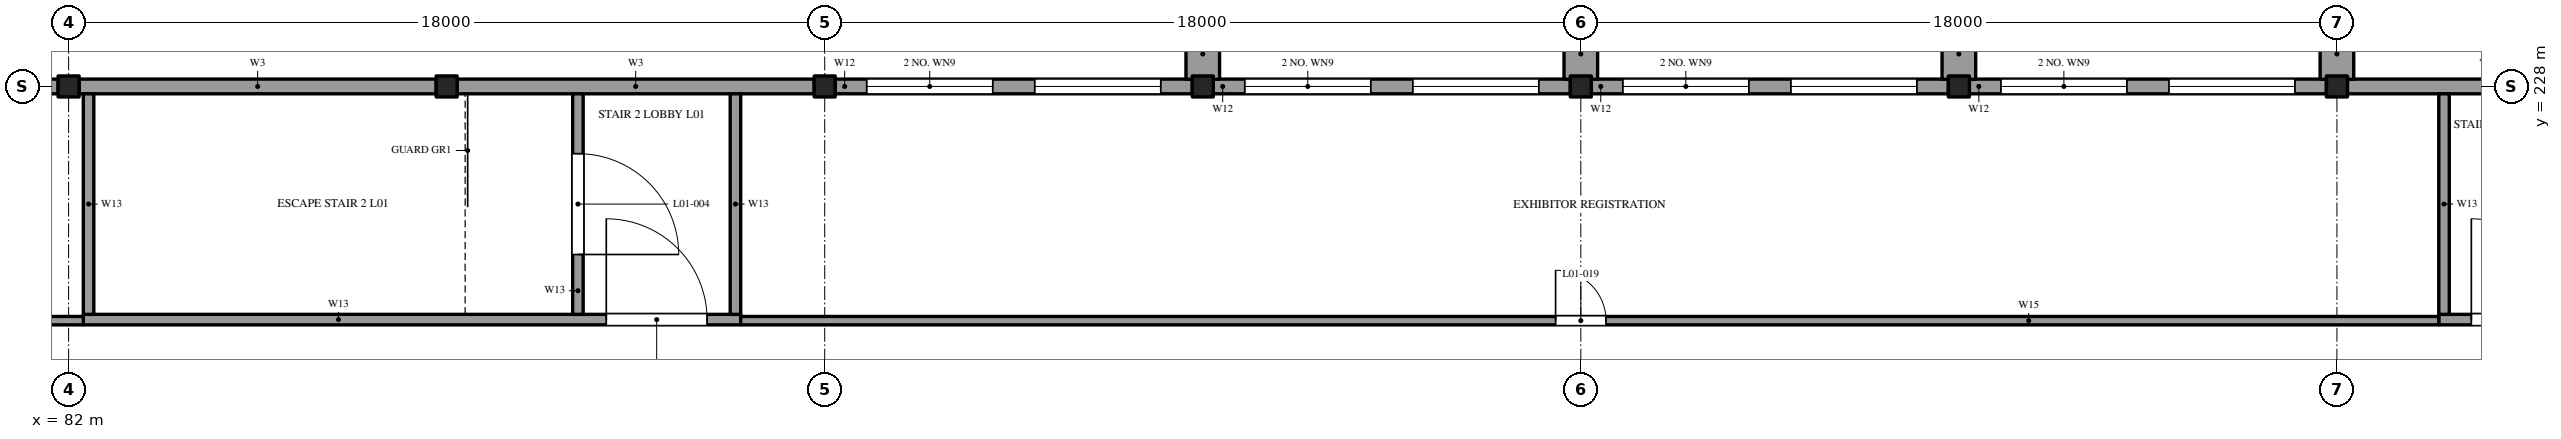
"""IFC4 building model, lengths in metres.
Left out: names, types, materials, properties, quantities, classifications, styles, units other than length and angle.
Written with IfcOpenShell. Run it as: python <this file> out.ifc"""

import sys

from ifc_helpers import new_model, si_unit, direction, frame, frame_2d, origin, origin_2d, place, context, subcontext, project, spatial, polyline, rectangle, outline, extrude, element, fill, save


model = new_model("IFC4")
c1 = context("Model", 3, precision=1e-05, world=origin(), true_north=direction((0.0, 1.0)))
c2 = subcontext(c1, "Body", "Model", "MODEL_VIEW")
j1 = project(units=[si_unit("LENGTHUNIT", "METRE"), si_unit("PLANEANGLEUNIT", "RADIAN")], contexts=[c1])
p1 = place(None, origin())
s1 = spatial("IfcSite", under=j1, at=p1, CompositionType="ELEMENT")
p2 = place(p1, origin())
s2 = spatial("IfcBuilding", under=s1, at=p2, CompositionType="ELEMENT")
p3 = place(p2, frame((0.0, 0.0, 7.2)))
s3 = spatial("IfcBuildingStorey", under=s2, at=p3, CompositionType="ELEMENT", Elevation=7.2)
for number, where, z_axis, x_axis in (
    (1, (82.0, 228.0, 0.0), (0.0, 0.0, 1.0), (1.0, 0.0, 0.0)),
    (2, (91.0, 228.0, 0.0), (0.0, 0.0, 1.0), (1.0, 0.0, 0.0)),
    (3, (100.0, 228.0, 0.0), (0.0, 0.0, 1.0), (1.0, 0.0, 0.0)),
    (4, (109.0, 228.0, 0.0), (0.0, 0.0, 1.0), (1.0, 0.0, 0.0)),
    (5, (118.0, 228.0, 0.0), (0.0, 0.0, 1.0), (1.0, 0.0, 0.0)),
    (6, (127.0, 228.0, 0.0), (0.0, 0.0, 1.0), (1.0, 0.0, 0.0)),
    (7, (136.0, 228.0, 0.0), (0.0, 0.0, 1.0), (1.0, 0.0, 0.0)),
):
    element("IfcColumn", number, at=place(p3, frame(where, z_axis=z_axis, x_axis=x_axis)), inside=s3, PredefinedType="COLUMN", context=c2, shape_type="SweptSolid", body=[
        extrude(rectangle(XDim=0.5, YDim=0.5, at=origin_2d()), origin(), (0.0, 0.0, 1.0), 4.121),
    ])
p4 = place(p3, frame((73.25, 228.0, 0.0), z_axis=(0.0, 0.0, 1.0), x_axis=(1.0, 0.0, 0.0)))
e8 = element("IfcWall", 8, at=p4, inside=s3, PredefinedType="SOLIDWALL", context=c2, shape_type="SweptSolid", body=[
    extrude(rectangle(XDim=8.5, YDim=0.35, at=frame_2d((4.25, 0.0))), origin(), (0.0, 0.0, 1.0), 4.112),
])
p5 = place(p4, frame((0.75, 0.0, 1.0)))
e9 = element("IfcOpeningElement", 9, at=p5, cuts=e8, PredefinedType="OPENING", context=c2, shape_type="SweptSolid", body=[
    extrude(rectangle(XDim=3.0, YDim=2.0, at=frame_2d((1.5, 1.0))), frame((0.0, 0.185, 0.0), z_axis=(0.0, -1.0, 0.0), x_axis=(1.0, 0.0, 0.0)), (0.0, 0.0, 1.0), 0.37),
])
p6 = place(p4, frame((4.75, 0.0, 1.0)))
e10 = element("IfcOpeningElement", 10, at=p6, cuts=e8, PredefinedType="OPENING", context=c2, shape_type="SweptSolid", body=[
    extrude(rectangle(XDim=3.0, YDim=2.0, at=frame_2d((1.5, 1.0))), frame((0.0, 0.185, 0.0), z_axis=(0.0, -1.0, 0.0), x_axis=(1.0, 0.0, 0.0)), (0.0, 0.0, 1.0), 0.37),
])
for number, where, z_axis, x_axis in (
    (11, (82.25, 228.0, 0.0), (0.0, 0.0, 1.0), (1.0, 0.0, 0.0)),
    (12, (91.25, 228.0, 0.0), (0.0, 0.0, 1.0), (1.0, 0.0, 0.0)),
):
    element("IfcWall", number, at=place(p3, frame(where, z_axis=z_axis, x_axis=x_axis)), inside=s3, PredefinedType="SOLIDWALL", context=c2, shape_type="SweptSolid", body=[
        extrude(rectangle(XDim=8.5, YDim=0.35, at=frame_2d((4.25, 0.0))), origin(), (0.0, 0.0, 1.0), 4.112),
    ])
p7 = place(p3, frame((100.25, 228.0, 0.0), z_axis=(0.0, 0.0, 1.0), x_axis=(1.0, 0.0, 0.0)))
e13 = element("IfcWall", 13, at=p7, inside=s3, PredefinedType="SOLIDWALL", context=c2, shape_type="SweptSolid", body=[
    extrude(rectangle(XDim=8.5, YDim=0.35, at=frame_2d((4.25, 0.0))), origin(), (0.0, 0.0, 1.0), 4.112),
])
p8 = place(p7, frame((0.75, 0.0, 1.0)))
e14 = element("IfcOpeningElement", 14, at=p8, cuts=e13, PredefinedType="OPENING", context=c2, shape_type="SweptSolid", body=[
    extrude(rectangle(XDim=3.0, YDim=2.0, at=frame_2d((1.5, 1.0))), frame((0.0, 0.185, 0.0), z_axis=(0.0, -1.0, 0.0), x_axis=(1.0, 0.0, 0.0)), (0.0, 0.0, 1.0), 0.37),
])
p9 = place(p7, frame((4.75, 0.0, 1.0)))
e15 = element("IfcOpeningElement", 15, at=p9, cuts=e13, PredefinedType="OPENING", context=c2, shape_type="SweptSolid", body=[
    extrude(rectangle(XDim=3.0, YDim=2.0, at=frame_2d((1.5, 1.0))), frame((0.0, 0.185, 0.0), z_axis=(0.0, -1.0, 0.0), x_axis=(1.0, 0.0, 0.0)), (0.0, 0.0, 1.0), 0.37),
])
p10 = place(p3, frame((109.25, 228.0, 0.0), z_axis=(0.0, 0.0, 1.0), x_axis=(1.0, 0.0, 0.0)))
e16 = element("IfcWall", 16, at=p10, inside=s3, PredefinedType="SOLIDWALL", context=c2, shape_type="SweptSolid", body=[
    extrude(rectangle(XDim=8.5, YDim=0.35, at=frame_2d((4.25, 0.0))), origin(), (0.0, 0.0, 1.0), 4.112),
])
p11 = place(p10, frame((0.75, 0.0, 1.0)))
e17 = element("IfcOpeningElement", 17, at=p11, cuts=e16, PredefinedType="OPENING", context=c2, shape_type="SweptSolid", body=[
    extrude(rectangle(XDim=3.0, YDim=2.0, at=frame_2d((1.5, 1.0))), frame((0.0, 0.185, 0.0), z_axis=(0.0, -1.0, 0.0), x_axis=(1.0, 0.0, 0.0)), (0.0, 0.0, 1.0), 0.37),
])
p12 = place(p10, frame((4.75, 0.0, 1.0)))
e18 = element("IfcOpeningElement", 18, at=p12, cuts=e16, PredefinedType="OPENING", context=c2, shape_type="SweptSolid", body=[
    extrude(rectangle(XDim=3.0, YDim=2.0, at=frame_2d((1.5, 1.0))), frame((0.0, 0.185, 0.0), z_axis=(0.0, -1.0, 0.0), x_axis=(1.0, 0.0, 0.0)), (0.0, 0.0, 1.0), 0.37),
])
p13 = place(p3, frame((118.25, 228.0, 0.0), z_axis=(0.0, 0.0, 1.0), x_axis=(1.0, 0.0, 0.0)))
e19 = element("IfcWall", 19, at=p13, inside=s3, PredefinedType="SOLIDWALL", context=c2, shape_type="SweptSolid", body=[
    extrude(rectangle(XDim=8.5, YDim=0.35, at=frame_2d((4.25, 0.0))), origin(), (0.0, 0.0, 1.0), 4.112),
])
p14 = place(p13, frame((0.75, 0.0, 1.0)))
e20 = element("IfcOpeningElement", 20, at=p14, cuts=e19, PredefinedType="OPENING", context=c2, shape_type="SweptSolid", body=[
    extrude(rectangle(XDim=3.0, YDim=2.0, at=frame_2d((1.5, 1.0))), frame((0.0, 0.185, 0.0), z_axis=(0.0, -1.0, 0.0), x_axis=(1.0, 0.0, 0.0)), (0.0, 0.0, 1.0), 0.37),
])
p15 = place(p13, frame((4.75, 0.0, 1.0)))
e21 = element("IfcOpeningElement", 21, at=p15, cuts=e19, PredefinedType="OPENING", context=c2, shape_type="SweptSolid", body=[
    extrude(rectangle(XDim=3.0, YDim=2.0, at=frame_2d((1.5, 1.0))), frame((0.0, 0.185, 0.0), z_axis=(0.0, -1.0, 0.0), x_axis=(1.0, 0.0, 0.0)), (0.0, 0.0, 1.0), 0.37),
])
p16 = place(p3, frame((127.25, 228.0, 0.0), z_axis=(0.0, 0.0, 1.0), x_axis=(1.0, 0.0, 0.0)))
e22 = element("IfcWall", 22, at=p16, inside=s3, PredefinedType="SOLIDWALL", context=c2, shape_type="SweptSolid", body=[
    extrude(rectangle(XDim=8.5, YDim=0.35, at=frame_2d((4.25, 0.0))), origin(), (0.0, 0.0, 1.0), 4.112),
])
p17 = place(p16, frame((0.75, 0.0, 1.0)))
e23 = element("IfcOpeningElement", 23, at=p17, cuts=e22, PredefinedType="OPENING", context=c2, shape_type="SweptSolid", body=[
    extrude(rectangle(XDim=3.0, YDim=2.0, at=frame_2d((1.5, 1.0))), frame((0.0, 0.185, 0.0), z_axis=(0.0, -1.0, 0.0), x_axis=(1.0, 0.0, 0.0)), (0.0, 0.0, 1.0), 0.37),
])
p18 = place(p16, frame((4.75, 0.0, 1.0)))
e24 = element("IfcOpeningElement", 24, at=p18, cuts=e22, PredefinedType="OPENING", context=c2, shape_type="SweptSolid", body=[
    extrude(rectangle(XDim=3.0, YDim=2.0, at=frame_2d((1.5, 1.0))), frame((0.0, 0.185, 0.0), z_axis=(0.0, -1.0, 0.0), x_axis=(1.0, 0.0, 0.0)), (0.0, 0.0, 1.0), 0.37),
])
p19 = place(p3, frame((136.25, 228.0, 0.0), z_axis=(0.0, 0.0, 1.0), x_axis=(1.0, 0.0, 0.0)))
e25 = element("IfcWall", 25, at=p19, inside=s3, PredefinedType="SOLIDWALL", context=c2, shape_type="SweptSolid", body=[
    extrude(rectangle(XDim=8.5, YDim=0.35, at=frame_2d((4.25, 0.0))), origin(), (0.0, 0.0, 1.0), 4.112),
])
p20 = place(p3, frame((82.35, 222.45, 0.0), z_axis=(0.0, 0.0, 1.0), x_axis=(1.0, 0.0, 0.0)))
e26 = element("IfcWall", 26, at=p20, inside=s3, PredefinedType="SOLIDWALL", context=c2, shape_type="SweptSolid", body=[
    extrude(rectangle(XDim=15.65, YDim=0.25, at=frame_2d((7.825, 0.0))), origin(), (0.0, 0.0, 1.0), 4.406),
])
p21 = place(p20, frame((12.45, 0.0, 0.0)))
e27 = element("IfcOpeningElement", 27, at=p21, cuts=e26, PredefinedType="OPENING", context=c2, shape_type="SweptSolid", body=[
    extrude(rectangle(XDim=2.4, YDim=2.2, at=frame_2d((1.2, 1.1))), frame((0.0, 0.135, 0.0), z_axis=(0.0, -1.0, 0.0), x_axis=(1.0, 0.0, 0.0)), (0.0, 0.0, 1.0), 0.27),
])
p22 = place(p3, frame((94.125, 222.575, 0.0), z_axis=(0.0, 0.0, 1.0), x_axis=(0.0, 1.0, 0.0)))
e28 = element("IfcWall", 28, at=p22, inside=s3, PredefinedType="SOLIDWALL", context=c2, shape_type="SweptSolid", body=[
    extrude(outline(polyline([(0.0, 0.0), (5.25, 0.0), (5.25, 4.124), (0.0, 4.399), (0.0, 0.0)])), frame((0.0, 0.125, 0.0), z_axis=(0.0, -1.0, 0.0), x_axis=(1.0, 0.0, 0.0)), (0.0, 0.0, 1.0), 0.25),
])
p23 = place(p22, frame((1.425, 0.0, 0.0)))
e29 = element("IfcOpeningElement", 29, at=p23, cuts=e28, PredefinedType="OPENING", context=c2, shape_type="SweptSolid", body=[
    extrude(rectangle(XDim=2.4, YDim=2.2, at=frame_2d((1.2, 1.1))), frame((0.0, 0.135, 0.0), z_axis=(0.0, -1.0, 0.0), x_axis=(1.0, 0.0, 0.0)), (0.0, 0.0, 1.0), 0.27),
])
for number, where, z_axis, x_axis in (
    (30, (82.475, 222.575, 0.0), (0.0, 0.0, 1.0), (0.0, 1.0, 0.0)),
    (31, (97.875, 222.575, 0.0), (0.0, 0.0, 1.0), (0.0, 1.0, 0.0)),
):
    element("IfcWall", number, at=place(p3, frame(where, z_axis=z_axis, x_axis=x_axis)), inside=s3, PredefinedType="SOLIDWALL", context=c2, shape_type="SweptSolid", body=[
        extrude(outline(polyline([(0.0, 0.0), (5.25, 0.0), (5.25, 4.124), (0.0, 4.399), (0.0, 0.0)])), frame((0.0, 0.125, 0.0), z_axis=(0.0, -1.0, 0.0), x_axis=(1.0, 0.0, 0.0)), (0.0, 0.0, 1.0), 0.25),
    ])
p24 = place(p3, frame((138.425, 222.45, 0.0), z_axis=(0.0, 0.0, 1.0), x_axis=(1.0, 0.0, 0.0)))
e32 = element("IfcWall", 32, at=p24, inside=s3, PredefinedType="SOLIDWALL", context=c2, shape_type="SweptSolid", body=[
    extrude(rectangle(XDim=15.4, YDim=0.25, at=frame_2d((7.7, 0.0))), origin(), (0.0, 0.0, 1.0), 4.406),
])
p25 = place(p24, frame((0.775, 0.0, 0.0)))
e33 = element("IfcOpeningElement", 33, at=p25, cuts=e32, PredefinedType="OPENING", context=c2, shape_type="SweptSolid", body=[
    extrude(rectangle(XDim=2.4, YDim=2.2, at=frame_2d((1.2, 1.1))), frame((0.0, 0.135, 0.0), z_axis=(0.0, -1.0, 0.0), x_axis=(1.0, 0.0, 0.0)), (0.0, 0.0, 1.0), 0.27),
])
p26 = place(p3, frame((138.55, 222.575, 0.0), z_axis=(0.0, 0.0, 1.0), x_axis=(0.0, 1.0, 0.0)))
e34 = element("IfcWall", 34, at=p26, inside=s3, PredefinedType="SOLIDWALL", context=c2, shape_type="SweptSolid", body=[
    extrude(outline(polyline([(0.0, 0.0), (5.25, 0.0), (5.25, 4.124), (0.0, 4.399), (0.0, 0.0)])), frame((0.0, 0.125, 0.0), z_axis=(0.0, -1.0, 0.0), x_axis=(1.0, 0.0, 0.0)), (0.0, 0.0, 1.0), 0.25),
])
for number, where, z_axis, x_axis in (
    (35, (109.0, 228.17, 0.0), (0.0, 0.0, 1.0), (0.0, 1.0, 0.0)),
    (36, (118.0, 228.17, 0.0), (0.0, 0.0, 1.0), (0.0, 1.0, 0.0)),
    (37, (127.0, 228.17, 0.0), (0.0, 0.0, 1.0), (0.0, 1.0, 0.0)),
    (38, (136.0, 228.17, 0.0), (0.0, 0.0, 1.0), (0.0, 1.0, 0.0)),
):
    element("IfcWall", number, at=place(p3, frame(where, z_axis=z_axis, x_axis=x_axis)), inside=s3, PredefinedType="SOLIDWALL", context=c2, shape_type="SweptSolid", body=[
        extrude(rectangle(XDim=1.205, YDim=0.8, at=frame_2d((0.603, 0.0))), origin(), (0.0, 0.0, 1.0), 4.1),
    ])
p27 = place(p3, frame((43.575, 222.425, 0.0), z_axis=(0.0, 0.0, 1.0), x_axis=(1.0, 0.0, 0.0)))
e39 = element("IfcWall", 39, at=p27, inside=s3, PredefinedType="PARTITIONING", context=c2, shape_type="SweptSolid", body=[
    extrude(rectangle(XDim=38.775, YDim=0.2, at=frame_2d((19.388, 0.0))), origin(), (0.0, 0.0, 1.0), 4.408),
])
p28 = place(p27, frame((17.825, 0.0, 0.0)))
e40 = element("IfcOpeningElement", 40, at=p28, cuts=e39, PredefinedType="OPENING", context=c2, shape_type="SweptSolid", body=[
    extrude(rectangle(XDim=1.2, YDim=2.1, at=frame_2d((0.6, 1.05))), frame((0.0, 0.11, 0.0), z_axis=(0.0, -1.0, 0.0), x_axis=(1.0, 0.0, 0.0)), (0.0, 0.0, 1.0), 0.22),
])
p29 = place(p3, frame((98.0, 222.425, 0.0), z_axis=(0.0, 0.0, 1.0), x_axis=(1.0, 0.0, 0.0)))
e41 = element("IfcWall", 41, at=p29, inside=s3, PredefinedType="PARTITIONING", context=c2, shape_type="SweptSolid", body=[
    extrude(rectangle(XDim=40.425, YDim=0.2, at=frame_2d((20.212, 0.0))), origin(), (0.0, 0.0, 1.0), 4.408),
])
p30 = place(p29, frame((19.4, 0.0, 0.0)))
e42 = element("IfcOpeningElement", 42, at=p30, cuts=e41, PredefinedType="OPENING", context=c2, shape_type="SweptSolid", body=[
    extrude(rectangle(XDim=1.2, YDim=2.1, at=frame_2d((0.6, 1.05))), frame((0.0, 0.11, 0.0), z_axis=(0.0, -1.0, 0.0), x_axis=(1.0, 0.0, 0.0)), (0.0, 0.0, 1.0), 0.22),
])
p31 = place(p8, origin())
e43 = element("IfcWindow", 43, at=p31, inside=s3, PartitioningType="SINGLE_PANEL", PredefinedType="WINDOW", context=c2, shape_type="SweptSolid", body=[
    extrude(rectangle(XDim=3.0, YDim=2.0, at=frame_2d((1.5, 1.0))), frame((0.0, 0.03, 0.0), z_axis=(0.0, -1.0, 0.0), x_axis=(1.0, 0.0, 0.0)), (0.0, 0.0, 1.0), 0.06),
])
fill(e14, e43)
p32 = place(p9, origin())
e44 = element("IfcWindow", 44, at=p32, inside=s3, PartitioningType="SINGLE_PANEL", PredefinedType="WINDOW", context=c2, shape_type="SweptSolid", body=[
    extrude(rectangle(XDim=3.0, YDim=2.0, at=frame_2d((1.5, 1.0))), frame((0.0, 0.03, 0.0), z_axis=(0.0, -1.0, 0.0), x_axis=(1.0, 0.0, 0.0)), (0.0, 0.0, 1.0), 0.06),
])
fill(e15, e44)
p33 = place(p11, origin())
e45 = element("IfcWindow", 45, at=p33, inside=s3, PartitioningType="SINGLE_PANEL", PredefinedType="WINDOW", context=c2, shape_type="SweptSolid", body=[
    extrude(rectangle(XDim=3.0, YDim=2.0, at=frame_2d((1.5, 1.0))), frame((0.0, 0.03, 0.0), z_axis=(0.0, -1.0, 0.0), x_axis=(1.0, 0.0, 0.0)), (0.0, 0.0, 1.0), 0.06),
])
fill(e17, e45)
p34 = place(p12, origin())
e46 = element("IfcWindow", 46, at=p34, inside=s3, PartitioningType="SINGLE_PANEL", PredefinedType="WINDOW", context=c2, shape_type="SweptSolid", body=[
    extrude(rectangle(XDim=3.0, YDim=2.0, at=frame_2d((1.5, 1.0))), frame((0.0, 0.03, 0.0), z_axis=(0.0, -1.0, 0.0), x_axis=(1.0, 0.0, 0.0)), (0.0, 0.0, 1.0), 0.06),
])
fill(e18, e46)
p35 = place(p14, origin())
e47 = element("IfcWindow", 47, at=p35, inside=s3, PartitioningType="SINGLE_PANEL", PredefinedType="WINDOW", context=c2, shape_type="SweptSolid", body=[
    extrude(rectangle(XDim=3.0, YDim=2.0, at=frame_2d((1.5, 1.0))), frame((0.0, 0.03, 0.0), z_axis=(0.0, -1.0, 0.0), x_axis=(1.0, 0.0, 0.0)), (0.0, 0.0, 1.0), 0.06),
])
fill(e20, e47)
p36 = place(p15, origin())
e48 = element("IfcWindow", 48, at=p36, inside=s3, PartitioningType="SINGLE_PANEL", PredefinedType="WINDOW", context=c2, shape_type="SweptSolid", body=[
    extrude(rectangle(XDim=3.0, YDim=2.0, at=frame_2d((1.5, 1.0))), frame((0.0, 0.03, 0.0), z_axis=(0.0, -1.0, 0.0), x_axis=(1.0, 0.0, 0.0)), (0.0, 0.0, 1.0), 0.06),
])
fill(e21, e48)
p37 = place(p17, origin())
e49 = element("IfcWindow", 49, at=p37, inside=s3, PartitioningType="SINGLE_PANEL", PredefinedType="WINDOW", context=c2, shape_type="SweptSolid", body=[
    extrude(rectangle(XDim=3.0, YDim=2.0, at=frame_2d((1.5, 1.0))), frame((0.0, 0.03, 0.0), z_axis=(0.0, -1.0, 0.0), x_axis=(1.0, 0.0, 0.0)), (0.0, 0.0, 1.0), 0.06),
])
fill(e23, e49)
p38 = place(p18, origin())
e50 = element("IfcWindow", 50, at=p38, inside=s3, PartitioningType="SINGLE_PANEL", PredefinedType="WINDOW", context=c2, shape_type="SweptSolid", body=[
    extrude(rectangle(XDim=3.0, YDim=2.0, at=frame_2d((1.5, 1.0))), frame((0.0, 0.03, 0.0), z_axis=(0.0, -1.0, 0.0), x_axis=(1.0, 0.0, 0.0)), (0.0, 0.0, 1.0), 0.06),
])
fill(e24, e50)
p39 = place(p21, origin())
e51 = element("IfcDoor", 51, at=p39, inside=s3, OperationType="DOUBLE_DOOR_SINGLE_SWING", PredefinedType="DOOR", context=c2, shape_type="SweptSolid", body=[
    extrude(rectangle(XDim=2.4, YDim=2.2, at=frame_2d((1.2, 1.1))), frame((0.0, 0.025, 0.0), z_axis=(0.0, -1.0, 0.0), x_axis=(1.0, 0.0, 0.0)), (0.0, 0.0, 1.0), 0.05),
])
fill(e27, e51)
p40 = place(p23, frame((2.4, 0.0, 0.0), z_axis=(0.0, 0.0, 1.0), x_axis=(-1.0, 0.0, 0.0)))
e52 = element("IfcDoor", 52, at=p40, inside=s3, OperationType="DOUBLE_DOOR_SINGLE_SWING", PredefinedType="DOOR", context=c2, shape_type="SweptSolid", body=[
    extrude(rectangle(XDim=2.4, YDim=2.2, at=frame_2d((1.2, 1.1))), frame((0.0, 0.025, 0.0), z_axis=(0.0, -1.0, 0.0), x_axis=(1.0, 0.0, 0.0)), (0.0, 0.0, 1.0), 0.05),
])
fill(e29, e52)
p41 = place(p25, origin())
e53 = element("IfcDoor", 53, at=p41, inside=s3, OperationType="DOUBLE_DOOR_SINGLE_SWING", PredefinedType="DOOR", context=c2, shape_type="SweptSolid", body=[
    extrude(rectangle(XDim=2.4, YDim=2.2, at=frame_2d((1.2, 1.1))), frame((0.0, 0.025, 0.0), z_axis=(0.0, -1.0, 0.0), x_axis=(1.0, 0.0, 0.0)), (0.0, 0.0, 1.0), 0.05),
])
fill(e33, e53)
p42 = place(p30, origin())
e54 = element("IfcDoor", 54, at=p42, inside=s3, OperationType="SINGLE_SWING_LEFT", PredefinedType="DOOR", context=c2, shape_type="SweptSolid", body=[
    extrude(rectangle(XDim=1.2, YDim=2.1, at=frame_2d((0.6, 1.05))), frame((0.0, 0.025, 0.0), z_axis=(0.0, -1.0, 0.0), x_axis=(1.0, 0.0, 0.0)), (0.0, 0.0, 1.0), 0.05),
])
fill(e42, e54)
save(model, sys.argv[1])
